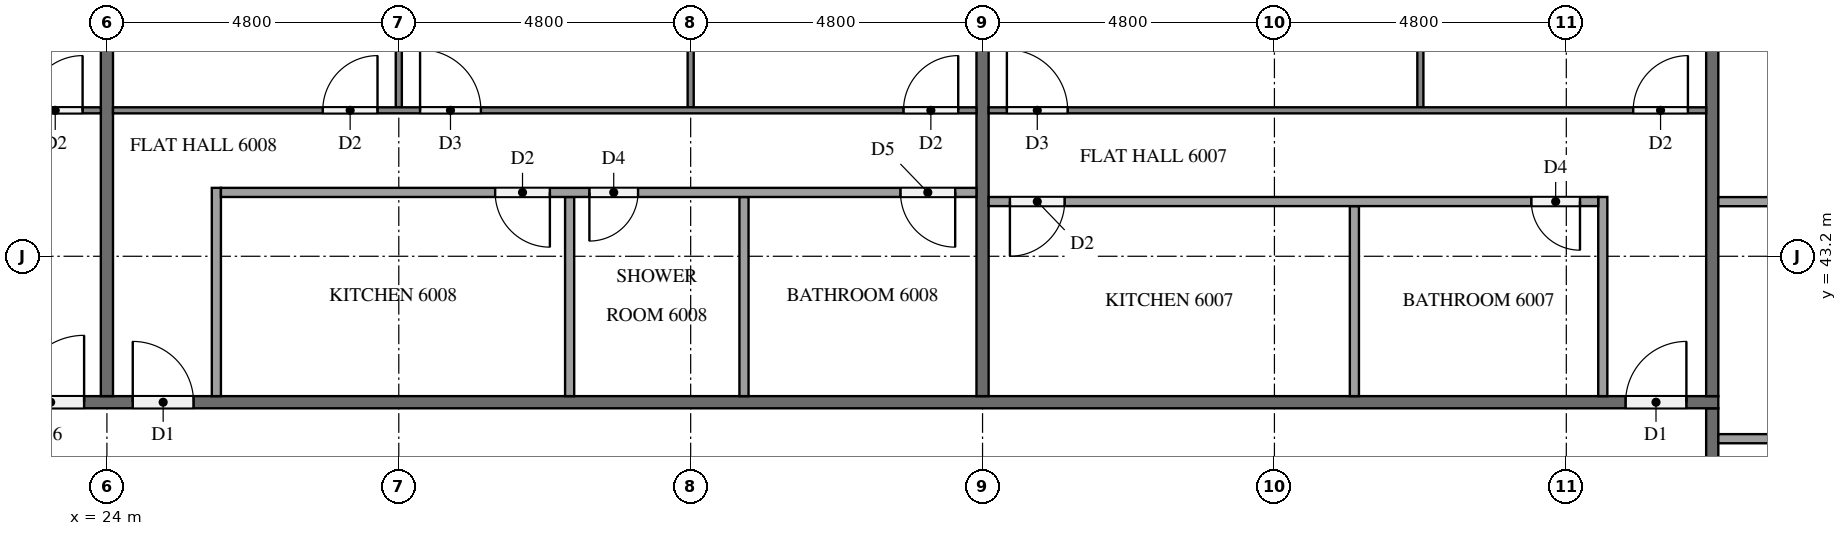
"""IFC4 building model, lengths in metres.
Left out: names, types, materials, properties, quantities, classifications, styles, units other than length and angle.
Written with IfcOpenShell. Run it as: python <this file> out.ifc"""

import sys

from ifc_helpers import new_model, si_unit, direction, frame, frame_2d, origin, place, context, subcontext, project, spatial, rectangle, extrude, element, fill, save


model = new_model("IFC4")
c1 = context("Model", 3, precision=1e-05, world=origin(), true_north=direction((0.0, 1.0)))
c2 = subcontext(c1, "Body", "Model", "MODEL_VIEW")
j1 = project(units=[si_unit("LENGTHUNIT", "METRE"), si_unit("PLANEANGLEUNIT", "RADIAN")], contexts=[c1])
p1 = place(None, origin())
s1 = spatial("IfcSite", under=j1, at=p1, CompositionType="ELEMENT")
p2 = place(p1, origin())
s2 = spatial("IfcBuilding", under=s1, at=p2, CompositionType="ELEMENT")
p3 = place(p2, frame((0.0, 0.0, 229.8)))
s3 = spatial("IfcBuildingStorey", under=s2, at=p3, CompositionType="ELEMENT", Elevation=229.8)
p4 = place(p3, frame((50.4, 40.7, 0.0), z_axis=(0.0, 0.0, 1.0), x_axis=(0.0, -1.0, 0.0)))
e1 = element("IfcWall", 1, at=p4, inside=s3, PredefinedType="PARTITIONING", context=c2, shape_type="SweptSolid", body=[
    extrude(rectangle(XDim=28.6, YDim=0.2, at=frame_2d((14.3, 0.0))), origin(), (0.0, 0.0, 1.0), 3.1),
])
p5 = place(p4, frame((27.275, 0.0, 0.0)))
e2 = element("IfcOpeningElement", 2, at=p5, cuts=e1, PredefinedType="OPENING", context=c2, shape_type="SweptSolid", body=[
    extrude(rectangle(XDim=1.0, YDim=2.1, at=frame_2d((0.5, 1.05))), frame((0.0, 0.11, 0.0), z_axis=(0.0, -1.0, 0.0), x_axis=(1.0, 0.0, 0.0)), (0.0, 0.0, 1.0), 0.22),
])
p6 = place(p4, frame((2.725, 0.0, 0.0)))
e3 = element("IfcOpeningElement", 3, at=p6, cuts=e1, PredefinedType="OPENING", context=c2, shape_type="SweptSolid", body=[
    extrude(rectangle(XDim=1.0, YDim=2.1, at=frame_2d((0.5, 1.05))), frame((0.0, 0.11, 0.0), z_axis=(0.0, -1.0, 0.0), x_axis=(1.0, 0.0, 0.0)), (0.0, 0.0, 1.0), 0.22),
])
p7 = place(p4, frame((0.875, 0.0, 0.0)))
e4 = element("IfcOpeningElement", 4, at=p7, cuts=e1, PredefinedType="OPENING", context=c2, shape_type="SweptSolid", body=[
    extrude(rectangle(XDim=1.0, YDim=2.1, at=frame_2d((0.5, 1.05))), frame((0.0, 0.11, 0.0), z_axis=(0.0, -1.0, 0.0), x_axis=(1.0, 0.0, 0.0)), (0.0, 0.0, 1.0), 0.22),
])
p8 = place(p3, frame((11.9, 40.8, 0.0), z_axis=(0.0, 0.0, 1.0), x_axis=(1.0, 0.0, 0.0)))
e5 = element("IfcWall", 5, at=p8, inside=s3, PredefinedType="PARTITIONING", context=c2, shape_type="SweptSolid", body=[
    extrude(rectangle(XDim=38.6, YDim=0.2, at=frame_2d((19.3, 0.0))), origin(), (0.0, 0.0, 1.0), 3.1),
])
p9 = place(p8, frame((37.075, 0.0, 0.0)))
e6 = element("IfcOpeningElement", 6, at=p9, cuts=e5, PredefinedType="OPENING", context=c2, shape_type="SweptSolid", body=[
    extrude(rectangle(XDim=1.0, YDim=2.1, at=frame_2d((0.5, 1.05))), frame((0.0, 0.11, 0.0), z_axis=(0.0, -1.0, 0.0), x_axis=(1.0, 0.0, 0.0)), (0.0, 0.0, 1.0), 0.22),
])
p10 = place(p8, frame((12.525, 0.0, 0.0)))
e7 = element("IfcOpeningElement", 7, at=p10, cuts=e5, PredefinedType="OPENING", context=c2, shape_type="SweptSolid", body=[
    extrude(rectangle(XDim=1.0, YDim=2.1, at=frame_2d((0.5, 1.05))), frame((0.0, 0.11, 0.0), z_axis=(0.0, -1.0, 0.0), x_axis=(1.0, 0.0, 0.0)), (0.0, 0.0, 1.0), 0.22),
])
p11 = place(p8, frame((10.625, 0.0, 0.0)))
e8 = element("IfcOpeningElement", 8, at=p11, cuts=e5, PredefinedType="OPENING", context=c2, shape_type="SweptSolid", body=[
    extrude(rectangle(XDim=1.1, YDim=2.1, at=frame_2d((0.55, 1.05))), frame((0.0, 0.11, 0.0), z_axis=(0.0, -1.0, 0.0), x_axis=(1.0, 0.0, 0.0)), (0.0, 0.0, 1.0), 0.22),
])
p12 = place(p3, frame((50.4, 40.9, 0.0), z_axis=(0.0, 0.0, 1.0), x_axis=(0.0, 1.0, 0.0)))
e9 = element("IfcWall", 9, at=p12, inside=s3, PredefinedType="PARTITIONING", context=c2, shape_type="SweptSolid", body=[
    extrude(rectangle(XDim=11.8, YDim=0.2, at=frame_2d((5.9, 0.0))), origin(), (0.0, 0.0, 1.0), 3.1),
])
p13 = place(p3, frame((38.4, 52.475, 0.0), z_axis=(0.0, 0.0, 1.0), x_axis=(0.0, -1.0, 0.0)))
e10 = element("IfcWall", 10, at=p13, inside=s3, PredefinedType="PARTITIONING", context=c2, shape_type="SweptSolid", body=[
    extrude(rectangle(XDim=11.575, YDim=0.2, at=frame_2d((5.788, 0.0))), origin(), (0.0, 0.0, 1.0), 3.1),
])
p14 = place(p3, frame((24.0, 52.7, 0.0), z_axis=(0.0, 0.0, 1.0), x_axis=(0.0, -1.0, 0.0)))
e11 = element("IfcWall", 11, at=p14, inside=s3, PredefinedType="PARTITIONING", context=c2, shape_type="SweptSolid", body=[
    extrude(rectangle(XDim=11.8, YDim=0.2, at=frame_2d((5.9, 0.0))), origin(), (0.0, 0.0, 1.0), 3.1),
])
p15 = place(p3, frame((50.5, 44.098, 0.0), z_axis=(0.0, 0.0, 1.0), x_axis=(1.0, 0.0, 0.0)))
e12 = element("IfcWall", 12, at=p15, inside=s3, PredefinedType="PARTITIONING", context=c2, shape_type="SweptSolid", body=[
    extrude(rectangle(XDim=4.325, YDim=0.15, at=frame_2d((2.163, 0.0))), origin(), (0.0, 0.0, 1.0), 3.1),
])
p16 = place(p3, frame((50.5, 40.2, 0.0), z_axis=(0.0, 0.0, 1.0), x_axis=(1.0, 0.0, 0.0)))
e13 = element("IfcWall", 13, at=p16, inside=s3, PredefinedType="PARTITIONING", context=c2, shape_type="SweptSolid", body=[
    extrude(rectangle(XDim=4.475, YDim=0.15, at=frame_2d((2.238, 0.0))), origin(), (0.0, 0.0, 1.0), 3.1),
])
p17 = place(p3, frame((45.6, 45.65, 0.0), z_axis=(0.0, 0.0, 1.0), x_axis=(0.0, 1.0, 0.0)))
e14 = element("IfcWall", 14, at=p17, inside=s3, PredefinedType="PARTITIONING", context=c2, shape_type="SweptSolid", body=[
    extrude(rectangle(XDim=7.05, YDim=0.1, at=frame_2d((3.525, 0.0))), origin(), (0.0, 0.0, 1.0), 3.1),
])
p18 = place(p3, frame((38.5, 45.6, 0.0), z_axis=(0.0, 0.0, 1.0), x_axis=(1.0, 0.0, 0.0)))
e15 = element("IfcWall", 15, at=p18, inside=s3, PredefinedType="PARTITIONING", context=c2, shape_type="SweptSolid", body=[
    extrude(rectangle(XDim=11.8, YDim=0.1, at=frame_2d((5.9, 0.0))), origin(), (0.0, 0.0, 1.0), 3.1),
])
p19 = place(p18, frame((10.6, 0.0, 0.0)))
e16 = element("IfcOpeningElement", 16, at=p19, cuts=e15, PredefinedType="OPENING", context=c2, shape_type="SweptSolid", body=[
    extrude(rectangle(XDim=0.9, YDim=2.1, at=frame_2d((0.45, 1.05))), frame((0.0, 0.06, 0.0), z_axis=(0.0, -1.0, 0.0), x_axis=(1.0, 0.0, 0.0)), (0.0, 0.0, 1.0), 0.12),
])
p20 = place(p18, frame((0.3, 0.0, 0.0)))
e17 = element("IfcOpeningElement", 17, at=p20, cuts=e15, PredefinedType="OPENING", context=c2, shape_type="SweptSolid", body=[
    extrude(rectangle(XDim=1.0, YDim=2.1, at=frame_2d((0.5, 1.05))), frame((0.0, 0.06, 0.0), z_axis=(0.0, -1.0, 0.0), x_axis=(1.0, 0.0, 0.0)), (0.0, 0.0, 1.0), 0.12),
])
p21 = place(p3, frame((44.515, 40.9, 0.0), z_axis=(0.0, 0.0, 1.0), x_axis=(0.0, 1.0, 0.0)))
e18 = element("IfcWall", 18, at=p21, inside=s3, PredefinedType="PARTITIONING", context=c2, shape_type="SweptSolid", body=[
    extrude(rectangle(XDim=3.125, YDim=0.15, at=frame_2d((1.562, 0.0))), origin(), (0.0, 0.0, 1.0), 3.1),
])
p22 = place(p3, frame((48.6, 40.9, 0.0), z_axis=(0.0, 0.0, 1.0), x_axis=(0.0, 1.0, 0.0)))
e19 = element("IfcWall", 19, at=p22, inside=s3, PredefinedType="PARTITIONING", context=c2, shape_type="SweptSolid", body=[
    extrude(rectangle(XDim=3.275, YDim=0.15, at=frame_2d((1.638, 0.0))), origin(), (0.0, 0.0, 1.0), 3.1),
])
p23 = place(p3, frame((48.525, 44.1, 0.0), z_axis=(0.0, 0.0, 1.0), x_axis=(-1.0, 0.0, 0.0)))
e20 = element("IfcWall", 20, at=p23, inside=s3, PredefinedType="PARTITIONING", context=c2, shape_type="SweptSolid", body=[
    extrude(rectangle(XDim=10.025, YDim=0.15, at=frame_2d((5.012, 0.0))), origin(), (0.0, 0.0, 1.0), 3.1),
])
p24 = place(p23, frame((0.3, 0.0, 0.0)))
e21 = element("IfcOpeningElement", 21, at=p24, cuts=e20, PredefinedType="OPENING", context=c2, shape_type="SweptSolid", body=[
    extrude(rectangle(XDim=0.8, YDim=2.1, at=frame_2d((0.4, 1.05))), frame((0.0, 0.085, 0.0), z_axis=(0.0, -1.0, 0.0), x_axis=(1.0, 0.0, 0.0)), (0.0, 0.0, 1.0), 0.17),
])
p25 = place(p23, frame((8.775, 0.0, 0.0)))
e22 = element("IfcOpeningElement", 22, at=p25, cuts=e20, PredefinedType="OPENING", context=c2, shape_type="SweptSolid", body=[
    extrude(rectangle(XDim=0.9, YDim=2.1, at=frame_2d((0.45, 1.05))), frame((0.0, 0.085, 0.0), z_axis=(0.0, -1.0, 0.0), x_axis=(1.0, 0.0, 0.0)), (0.0, 0.0, 1.0), 0.17),
])
p26 = place(p3, frame((28.8, 45.65, 0.0), z_axis=(0.0, 0.0, 1.0), x_axis=(0.0, 1.0, 0.0)))
e23 = element("IfcWall", 23, at=p26, inside=s3, PredefinedType="PARTITIONING", context=c2, shape_type="SweptSolid", body=[
    extrude(rectangle(XDim=6.825, YDim=0.1, at=frame_2d((3.413, 0.0))), origin(), (0.0, 0.0, 1.0), 3.1),
])
p27 = place(p3, frame((33.6, 45.65, 0.0), z_axis=(0.0, 0.0, 1.0), x_axis=(0.0, 1.0, 0.0)))
e24 = element("IfcWall", 24, at=p27, inside=s3, PredefinedType="PARTITIONING", context=c2, shape_type="SweptSolid", body=[
    extrude(rectangle(XDim=7.05, YDim=0.1, at=frame_2d((3.525, 0.0))), origin(), (0.0, 0.0, 1.0), 3.1),
])
p28 = place(p3, frame((24.1, 45.6, 0.0), z_axis=(0.0, 0.0, 1.0), x_axis=(1.0, 0.0, 0.0)))
e25 = element("IfcWall", 25, at=p28, inside=s3, PredefinedType="PARTITIONING", context=c2, shape_type="SweptSolid", body=[
    extrude(rectangle(XDim=14.2, YDim=0.1, at=frame_2d((7.1, 0.0))), origin(), (0.0, 0.0, 1.0), 3.1),
])
p29 = place(p28, frame((3.45, 0.0, 0.0)))
e26 = element("IfcOpeningElement", 26, at=p29, cuts=e25, PredefinedType="OPENING", context=c2, shape_type="SweptSolid", body=[
    extrude(rectangle(XDim=0.9, YDim=2.1, at=frame_2d((0.45, 1.05))), frame((0.0, 0.06, 0.0), z_axis=(0.0, -1.0, 0.0), x_axis=(1.0, 0.0, 0.0)), (0.0, 0.0, 1.0), 0.12),
])
p30 = place(p28, frame((5.05, 0.0, 0.0)))
e27 = element("IfcOpeningElement", 27, at=p30, cuts=e25, PredefinedType="OPENING", context=c2, shape_type="SweptSolid", body=[
    extrude(rectangle(XDim=1.0, YDim=2.1, at=frame_2d((0.5, 1.05))), frame((0.0, 0.06, 0.0), z_axis=(0.0, -1.0, 0.0), x_axis=(1.0, 0.0, 0.0)), (0.0, 0.0, 1.0), 0.12),
])
p31 = place(p28, frame((13.0, 0.0, 0.0)))
e28 = element("IfcOpeningElement", 28, at=p31, cuts=e25, PredefinedType="OPENING", context=c2, shape_type="SweptSolid", body=[
    extrude(rectangle(XDim=0.9, YDim=2.1, at=frame_2d((0.45, 1.05))), frame((0.0, 0.06, 0.0), z_axis=(0.0, -1.0, 0.0), x_axis=(1.0, 0.0, 0.0)), (0.0, 0.0, 1.0), 0.12),
])
for number, where, z_axis, x_axis in (
    (29, (31.61, 40.9, 0.0), (0.0, 0.0, 1.0), (0.0, 1.0, 0.0)),
    (30, (34.477, 40.9, 0.0), (0.0, 0.0, 1.0), (0.0, 1.0, 0.0)),
):
    element("IfcWall", number, at=place(p3, frame(where, z_axis=z_axis, x_axis=x_axis)), inside=s3, PredefinedType="PARTITIONING", context=c2, shape_type="SweptSolid", body=[
        extrude(rectangle(XDim=3.275, YDim=0.15, at=frame_2d((1.638, 0.0))), origin(), (0.0, 0.0, 1.0), 3.1),
    ])
p32 = place(p3, frame((25.8, 40.9, 0.0), z_axis=(0.0, 0.0, 1.0), x_axis=(0.0, 1.0, 0.0)))
e31 = element("IfcWall", 31, at=p32, inside=s3, PredefinedType="PARTITIONING", context=c2, shape_type="SweptSolid", body=[
    extrude(rectangle(XDim=3.425, YDim=0.15, at=frame_2d((1.712, 0.0))), origin(), (0.0, 0.0, 1.0), 3.1),
])
p33 = place(p3, frame((38.3, 44.25, 0.0), z_axis=(0.0, 0.0, 1.0), x_axis=(-1.0, 0.0, 0.0)))
e32 = element("IfcWall", 32, at=p33, inside=s3, PredefinedType="PARTITIONING", context=c2, shape_type="SweptSolid", body=[
    extrude(rectangle(XDim=12.425, YDim=0.15, at=frame_2d((6.212, 0.0))), origin(), (0.0, 0.0, 1.0), 3.1),
])
p34 = place(p33, frame((7.015, 0.0, 0.0)))
e33 = element("IfcOpeningElement", 33, at=p34, cuts=e32, PredefinedType="OPENING", context=c2, shape_type="SweptSolid", body=[
    extrude(rectangle(XDim=0.9, YDim=2.1, at=frame_2d((0.45, 1.05))), frame((0.0, 0.085, 0.0), z_axis=(0.0, -1.0, 0.0), x_axis=(1.0, 0.0, 0.0)), (0.0, 0.0, 1.0), 0.17),
])
p35 = place(p33, frame((5.565, 0.0, 0.0)))
e34 = element("IfcOpeningElement", 34, at=p35, cuts=e32, PredefinedType="OPENING", context=c2, shape_type="SweptSolid", body=[
    extrude(rectangle(XDim=0.8, YDim=2.1, at=frame_2d((0.4, 1.05))), frame((0.0, 0.085, 0.0), z_axis=(0.0, -1.0, 0.0), x_axis=(1.0, 0.0, 0.0)), (0.0, 0.0, 1.0), 0.17),
])
p36 = place(p33, frame((0.35, 0.0, 0.0)))
e35 = element("IfcOpeningElement", 35, at=p36, cuts=e32, PredefinedType="OPENING", context=c2, shape_type="SweptSolid", body=[
    extrude(rectangle(XDim=0.9, YDim=2.1, at=frame_2d((0.45, 1.05))), frame((0.0, 0.085, 0.0), z_axis=(0.0, -1.0, 0.0), x_axis=(1.0, 0.0, 0.0)), (0.0, 0.0, 1.0), 0.17),
])
p37 = place(p3, frame((4.9, 45.6, 0.0), z_axis=(0.0, 0.0, 1.0), x_axis=(1.0, 0.0, 0.0)))
e36 = element("IfcWall", 36, at=p37, inside=s3, PredefinedType="PARTITIONING", context=c2, shape_type="SweptSolid", body=[
    extrude(rectangle(XDim=19.0, YDim=0.1, at=frame_2d((9.5, 0.0))), origin(), (0.0, 0.0, 1.0), 3.1),
])
p38 = place(p37, frame((17.8, 0.0, 0.0)))
e37 = element("IfcOpeningElement", 37, at=p38, cuts=e36, PredefinedType="OPENING", context=c2, shape_type="SweptSolid", body=[
    extrude(rectangle(XDim=0.9, YDim=2.1, at=frame_2d((0.45, 1.05))), frame((0.0, 0.06, 0.0), z_axis=(0.0, -1.0, 0.0), x_axis=(1.0, 0.0, 0.0)), (0.0, 0.0, 1.0), 0.12),
])
p39 = place(p37, frame((9.85, 0.0, 0.0)))
e38 = element("IfcOpeningElement", 38, at=p39, cuts=e36, PredefinedType="OPENING", context=c2, shape_type="SweptSolid", body=[
    extrude(rectangle(XDim=0.9, YDim=2.1, at=frame_2d((0.45, 1.05))), frame((0.0, 0.06, 0.0), z_axis=(0.0, -1.0, 0.0), x_axis=(1.0, 0.0, 0.0)), (0.0, 0.0, 1.0), 0.12),
])
p40 = place(p37, frame((8.15, 0.0, 0.0)))
e39 = element("IfcOpeningElement", 39, at=p40, cuts=e36, PredefinedType="OPENING", context=c2, shape_type="SweptSolid", body=[
    extrude(rectangle(XDim=1.0, YDim=2.1, at=frame_2d((0.5, 1.05))), frame((0.0, 0.06, 0.0), z_axis=(0.0, -1.0, 0.0), x_axis=(1.0, 0.0, 0.0)), (0.0, 0.0, 1.0), 0.12),
])
p41 = place(p37, frame((0.3, 0.0, 0.0)))
e40 = element("IfcOpeningElement", 40, at=p41, cuts=e36, PredefinedType="OPENING", context=c2, shape_type="SweptSolid", body=[
    extrude(rectangle(XDim=0.9, YDim=2.1, at=frame_2d((0.45, 1.05))), frame((0.0, 0.06, 0.0), z_axis=(0.0, -1.0, 0.0), x_axis=(1.0, 0.0, 0.0)), (0.0, 0.0, 1.0), 0.12),
])
p42 = place(p9, origin())
e41 = element("IfcDoor", 41, at=p42, inside=s3, OperationType="SINGLE_SWING_RIGHT", PredefinedType="DOOR", context=c2, shape_type="SweptSolid", body=[
    extrude(rectangle(XDim=1.0, YDim=2.1, at=frame_2d((0.5, 1.05))), frame((0.0, 0.025, 0.0), z_axis=(0.0, -1.0, 0.0), x_axis=(1.0, 0.0, 0.0)), (0.0, 0.0, 1.0), 0.05),
])
fill(e6, e41)
p43 = place(p10, origin())
e42 = element("IfcDoor", 42, at=p43, inside=s3, OperationType="SINGLE_SWING_LEFT", PredefinedType="DOOR", context=c2, shape_type="SweptSolid", body=[
    extrude(rectangle(XDim=1.0, YDim=2.1, at=frame_2d((0.5, 1.05))), frame((0.0, 0.025, 0.0), z_axis=(0.0, -1.0, 0.0), x_axis=(1.0, 0.0, 0.0)), (0.0, 0.0, 1.0), 0.05),
])
fill(e7, e42)
p44 = place(p11, origin())
e43 = element("IfcDoor", 43, at=p44, inside=s3, OperationType="SINGLE_SWING_RIGHT", PredefinedType="DOOR", context=c2, shape_type="SweptSolid", body=[
    extrude(rectangle(XDim=1.1, YDim=2.1, at=frame_2d((0.55, 1.05))), frame((0.0, 0.025, 0.0), z_axis=(0.0, -1.0, 0.0), x_axis=(1.0, 0.0, 0.0)), (0.0, 0.0, 1.0), 0.05),
])
fill(e8, e43)
p45 = place(p19, origin())
e44 = element("IfcDoor", 44, at=p45, inside=s3, OperationType="SINGLE_SWING_RIGHT", PredefinedType="DOOR", context=c2, shape_type="SweptSolid", body=[
    extrude(rectangle(XDim=0.9, YDim=2.1, at=frame_2d((0.45, 1.05))), frame((0.0, 0.025, 0.0), z_axis=(0.0, -1.0, 0.0), x_axis=(1.0, 0.0, 0.0)), (0.0, 0.0, 1.0), 0.05),
])
fill(e16, e44)
p46 = place(p20, origin())
e45 = element("IfcDoor", 45, at=p46, inside=s3, OperationType="SINGLE_SWING_LEFT", PredefinedType="DOOR", context=c2, shape_type="SweptSolid", body=[
    extrude(rectangle(XDim=1.0, YDim=2.1, at=frame_2d((0.5, 1.05))), frame((0.0, 0.025, 0.0), z_axis=(0.0, -1.0, 0.0), x_axis=(1.0, 0.0, 0.0)), (0.0, 0.0, 1.0), 0.05),
])
fill(e17, e45)
p47 = place(p24, origin())
e46 = element("IfcDoor", 46, at=p47, inside=s3, OperationType="SINGLE_SWING_LEFT", PredefinedType="DOOR", context=c2, shape_type="SweptSolid", body=[
    extrude(rectangle(XDim=0.8, YDim=2.1, at=frame_2d((0.4, 1.05))), frame((0.0, 0.025, 0.0), z_axis=(0.0, -1.0, 0.0), x_axis=(1.0, 0.0, 0.0)), (0.0, 0.0, 1.0), 0.05),
])
fill(e21, e46)
p48 = place(p25, origin())
e47 = element("IfcDoor", 47, at=p48, inside=s3, OperationType="SINGLE_SWING_RIGHT", PredefinedType="DOOR", context=c2, shape_type="SweptSolid", body=[
    extrude(rectangle(XDim=0.9, YDim=2.1, at=frame_2d((0.45, 1.05))), frame((0.0, 0.025, 0.0), z_axis=(0.0, -1.0, 0.0), x_axis=(1.0, 0.0, 0.0)), (0.0, 0.0, 1.0), 0.05),
])
fill(e22, e47)
p49 = place(p29, origin())
e48 = element("IfcDoor", 48, at=p49, inside=s3, OperationType="SINGLE_SWING_RIGHT", PredefinedType="DOOR", context=c2, shape_type="SweptSolid", body=[
    extrude(rectangle(XDim=0.9, YDim=2.1, at=frame_2d((0.45, 1.05))), frame((0.0, 0.025, 0.0), z_axis=(0.0, -1.0, 0.0), x_axis=(1.0, 0.0, 0.0)), (0.0, 0.0, 1.0), 0.05),
])
fill(e26, e48)
p50 = place(p30, origin())
e49 = element("IfcDoor", 49, at=p50, inside=s3, OperationType="SINGLE_SWING_LEFT", PredefinedType="DOOR", context=c2, shape_type="SweptSolid", body=[
    extrude(rectangle(XDim=1.0, YDim=2.1, at=frame_2d((0.5, 1.05))), frame((0.0, 0.025, 0.0), z_axis=(0.0, -1.0, 0.0), x_axis=(1.0, 0.0, 0.0)), (0.0, 0.0, 1.0), 0.05),
])
fill(e27, e49)
p51 = place(p31, origin())
e50 = element("IfcDoor", 50, at=p51, inside=s3, OperationType="SINGLE_SWING_RIGHT", PredefinedType="DOOR", context=c2, shape_type="SweptSolid", body=[
    extrude(rectangle(XDim=0.9, YDim=2.1, at=frame_2d((0.45, 1.05))), frame((0.0, 0.025, 0.0), z_axis=(0.0, -1.0, 0.0), x_axis=(1.0, 0.0, 0.0)), (0.0, 0.0, 1.0), 0.05),
])
fill(e28, e50)
p52 = place(p34, origin())
e51 = element("IfcDoor", 51, at=p52, inside=s3, OperationType="SINGLE_SWING_LEFT", PredefinedType="DOOR", context=c2, shape_type="SweptSolid", body=[
    extrude(rectangle(XDim=0.9, YDim=2.1, at=frame_2d((0.45, 1.05))), frame((0.0, 0.025, 0.0), z_axis=(0.0, -1.0, 0.0), x_axis=(1.0, 0.0, 0.0)), (0.0, 0.0, 1.0), 0.05),
])
fill(e33, e51)
p53 = place(p35, origin())
e52 = element("IfcDoor", 52, at=p53, inside=s3, OperationType="SINGLE_SWING_RIGHT", PredefinedType="DOOR", context=c2, shape_type="SweptSolid", body=[
    extrude(rectangle(XDim=0.8, YDim=2.1, at=frame_2d((0.4, 1.05))), frame((0.0, 0.025, 0.0), z_axis=(0.0, -1.0, 0.0), x_axis=(1.0, 0.0, 0.0)), (0.0, 0.0, 1.0), 0.05),
])
fill(e34, e52)
p54 = place(p36, origin())
e53 = element("IfcDoor", 53, at=p54, inside=s3, OperationType="SINGLE_SWING_LEFT", PredefinedType="DOOR", context=c2, shape_type="SweptSolid", body=[
    extrude(rectangle(XDim=0.9, YDim=2.1, at=frame_2d((0.45, 1.05))), frame((0.0, 0.025, 0.0), z_axis=(0.0, -1.0, 0.0), x_axis=(1.0, 0.0, 0.0)), (0.0, 0.0, 1.0), 0.05),
])
fill(e35, e53)
p55 = place(p38, origin())
e54 = element("IfcDoor", 54, at=p55, inside=s3, OperationType="SINGLE_SWING_RIGHT", PredefinedType="DOOR", context=c2, shape_type="SweptSolid", body=[
    extrude(rectangle(XDim=0.9, YDim=2.1, at=frame_2d((0.45, 1.05))), frame((0.0, 0.025, 0.0), z_axis=(0.0, -1.0, 0.0), x_axis=(1.0, 0.0, 0.0)), (0.0, 0.0, 1.0), 0.05),
])
fill(e37, e54)
save(model, sys.argv[1])
